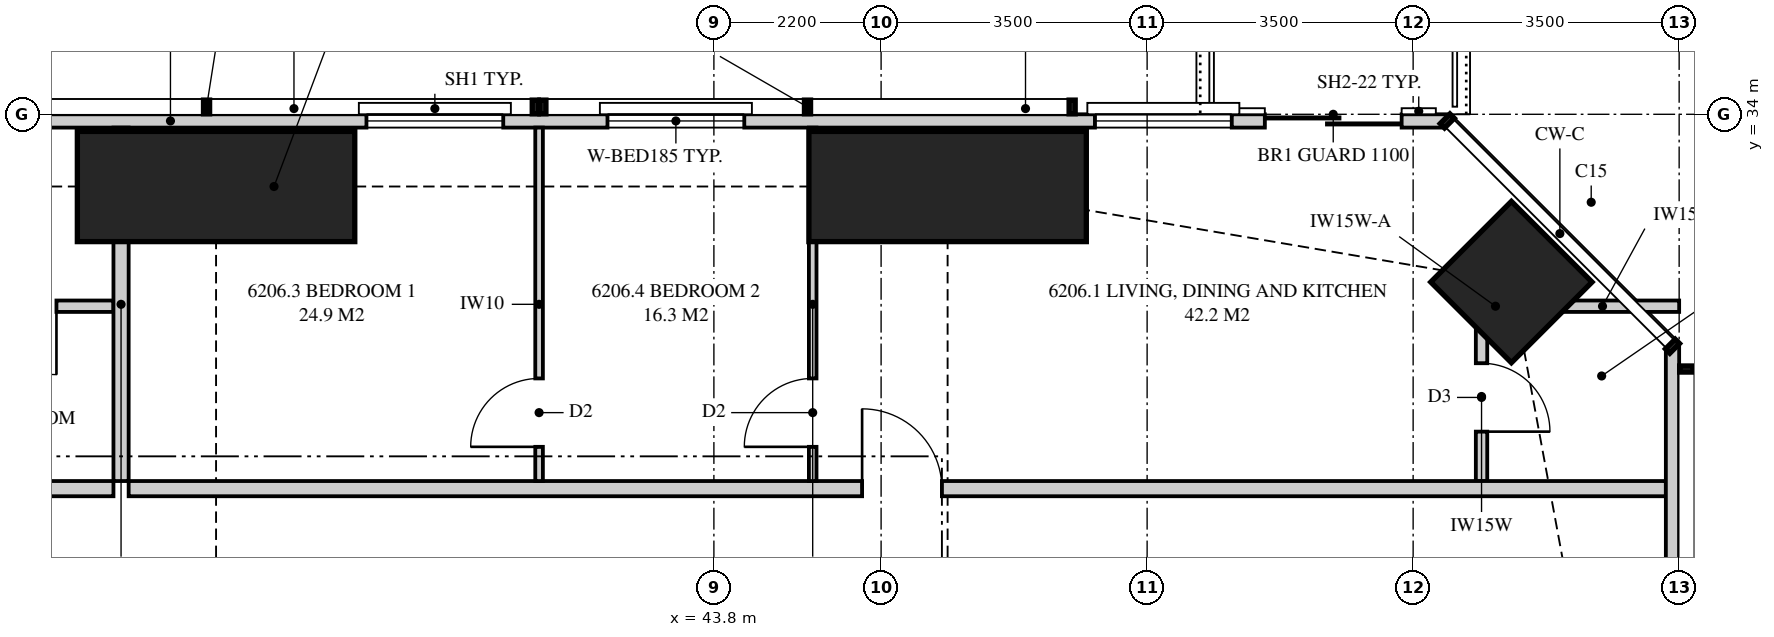
"""IFC4 building model, lengths in metres.
Left out: names, types, materials, properties, quantities, classifications, styles, units other than length and angle.
Written with IfcOpenShell. Run it as: python <this file> out.ifc"""

import sys

from ifc_helpers import new_model, si_unit, direction, frame, frame_2d, origin, origin_2d, place, context, subcontext, project, spatial, polyline, rectangle, outline, extrude, element, fill, save


model = new_model("IFC4")
c1 = context("Model", 3, precision=1e-05, world=origin(), true_north=direction((0.0, 1.0)))
c2 = subcontext(c1, "Body", "Model", "MODEL_VIEW")
j1 = project(units=[si_unit("LENGTHUNIT", "METRE"), si_unit("PLANEANGLEUNIT", "RADIAN")], contexts=[c1])
p1 = place(None, origin())
s1 = spatial("IfcSite", under=j1, at=p1, CompositionType="ELEMENT")
p2 = place(p1, origin())
s2 = spatial("IfcBuilding", under=s1, at=p2, CompositionType="ELEMENT")
p3 = place(p2, frame((0.0, 0.0, 228.45)))
s3 = spatial("IfcBuildingStorey", under=s2, at=p3, CompositionType="ELEMENT", Elevation=228.45)
p4 = place(p3, frame((54.293, 31.793, 0.0), z_axis=(0.0, 0.0, 1.0), x_axis=(0.707106781187, 0.707106781187, 0.0)))
e1 = element("IfcColumn", 1, at=p4, inside=s3, PredefinedType="COLUMN", context=c2, shape_type="SweptSolid", body=[
    extrude(rectangle(XDim=1.5, YDim=1.5, at=origin_2d()), origin(), (0.0, 0.0, 1.0), 3.5),
])
for number, where, z_axis, x_axis in (
    (2, (46.875, 33.05, 0.0), (0.0, 0.0, 1.0), (0.0, 1.0, 0.0)),
    (3, (37.25, 33.05, 0.0), (0.0, 0.0, 1.0), (0.0, 1.0, 0.0)),
):
    element("IfcColumn", number, at=place(p3, frame(where, z_axis=z_axis, x_axis=x_axis)), inside=s3, PredefinedType="COLUMN", context=c2, shape_type="SweptSolid", body=[
        extrude(rectangle(XDim=1.45, YDim=3.65, at=origin_2d()), origin(), (0.0, 0.0, 1.0), 3.5),
    ])
p5 = place(p3, frame((56.413, 3.051, 0.0), z_axis=(0.0, 0.0, 1.0), x_axis=(0.0, 1.0, 0.0)))
e4 = element("IfcWall", 4, at=p5, inside=s3, PredefinedType="SOLIDWALL", context=c2, shape_type="SweptSolid", body=[
    extrude(outline(polyline([(0.0, 0.0), (27.897, 0.0), (27.897, 3.26), (22.157, 3.26), (22.157, 2.3), (22.092, 2.3), (22.092, 3.26), (21.949, 3.26), (21.949, 2.3), (9.949, 2.3), (9.949, 3.26), (9.858, 3.26), (9.858, 2.3), (9.688, 2.3), (9.688, 3.26), (0.0, 3.26), (0.0, 0.0)])), frame((0.0, 0.087, 0.0), z_axis=(0.0, -1.0, 0.0), x_axis=(1.0, 0.0, 0.0)), (0.0, 0.0, 1.0), 0.175),
])
p6 = place(p5, frame((1.187, 0.0, 0.4)))
e5 = element("IfcOpeningElement", 5, at=p6, cuts=e4, PredefinedType="OPENING", context=c2, shape_type="SweptSolid", body=[
    extrude(rectangle(XDim=2.4, YDim=1.85, at=frame_2d((1.2, 0.925))), frame((0.0, 0.097, 0.0), z_axis=(0.0, -1.0, 0.0), x_axis=(1.0, 0.0, 0.0)), (0.0, 0.0, 1.0), 0.195),
])
p7 = place(p5, frame((11.897, 0.0, 0.4)))
e6 = element("IfcOpeningElement", 6, at=p7, cuts=e4, PredefinedType="OPENING", context=c2, shape_type="SweptSolid", body=[
    extrude(rectangle(XDim=1.8, YDim=1.85, at=frame_2d((0.9, 0.925))), frame((0.0, 0.097, 0.0), z_axis=(0.0, -1.0, 0.0), x_axis=(1.0, 0.0, 0.0)), (0.0, 0.0, 1.0), 0.195),
])
p8 = place(p5, frame((14.824, 0.0, 0.0)))
e7 = element("IfcOpeningElement", 7, at=p8, cuts=e4, PredefinedType="OPENING", context=c2, shape_type="SweptSolid", body=[
    extrude(rectangle(XDim=1.8, YDim=2.25, at=frame_2d((0.9, 1.125))), frame((0.0, 0.097, 0.0), z_axis=(0.0, -1.0, 0.0), x_axis=(1.0, 0.0, 0.0)), (0.0, 0.0, 1.0), 0.195),
])
p9 = place(p5, frame((18.224, 0.0, 0.4)))
e8 = element("IfcOpeningElement", 8, at=p9, cuts=e4, PredefinedType="OPENING", context=c2, shape_type="SweptSolid", body=[
    extrude(rectangle(XDim=1.8, YDim=1.85, at=frame_2d((0.9, 0.925))), frame((0.0, 0.097, 0.0), z_axis=(0.0, -1.0, 0.0), x_axis=(1.0, 0.0, 0.0)), (0.0, 0.0, 1.0), 0.195),
])
p10 = place(p3, frame((53.449, 33.913, 0.0), z_axis=(0.0, 0.0, 1.0), x_axis=(-1.0, 0.0, 0.0)))
e9 = element("IfcWall", 9, at=p10, inside=s3, PredefinedType="SOLIDWALL", context=c2, shape_type="SweptSolid", body=[
    extrude(outline(polyline([(0.0, 0.0), (33.597, 0.0), (33.597, 3.26), (26.039, 3.26), (26.039, 2.3), (25.955, 2.3), (25.955, 3.26), (25.824, 3.26), (25.824, 2.3), (6.574, 2.3), (6.574, 3.26), (6.442, 3.26), (6.442, 2.3), (6.359, 2.3), (6.359, 3.26), (0.0, 3.26), (0.0, 0.0)])), frame((0.0, 0.087, 0.0), z_axis=(0.0, -1.0, 0.0), x_axis=(1.0, 0.0, 0.0)), (0.0, 0.0, 1.0), 0.175),
])
p11 = place(p10, frame((0.6, 0.0, 0.0)))
e10 = element("IfcOpeningElement", 10, at=p11, cuts=e9, PredefinedType="OPENING", context=c2, shape_type="SweptSolid", body=[
    extrude(rectangle(XDim=1.8, YDim=2.25, at=frame_2d((0.9, 1.125))), frame((0.0, 0.097, 0.0), z_axis=(0.0, -1.0, 0.0), x_axis=(1.0, 0.0, 0.0)), (0.0, 0.0, 1.0), 0.195),
])
p12 = place(p10, frame((2.835, 0.0, 0.4)))
e11 = element("IfcOpeningElement", 11, at=p12, cuts=e9, PredefinedType="OPENING", context=c2, shape_type="SweptSolid", body=[
    extrude(rectangle(XDim=1.8, YDim=1.85, at=frame_2d((0.9, 0.925))), frame((0.0, 0.097, 0.0), z_axis=(0.0, -1.0, 0.0), x_axis=(1.0, 0.0, 0.0)), (0.0, 0.0, 1.0), 0.195),
])
p13 = place(p10, frame((9.249, 0.0, 0.4)))
e12 = element("IfcOpeningElement", 12, at=p13, cuts=e9, PredefinedType="OPENING", context=c2, shape_type="SweptSolid", body=[
    extrude(rectangle(XDim=1.8, YDim=1.85, at=frame_2d((0.9, 0.925))), frame((0.0, 0.097, 0.0), z_axis=(0.0, -1.0, 0.0), x_axis=(1.0, 0.0, 0.0)), (0.0, 0.0, 1.0), 0.195),
])
p14 = place(p10, frame((12.42, 0.0, 0.4)))
e13 = element("IfcOpeningElement", 13, at=p14, cuts=e9, PredefinedType="OPENING", context=c2, shape_type="SweptSolid", body=[
    extrude(rectangle(XDim=1.8, YDim=1.85, at=frame_2d((0.9, 0.925))), frame((0.0, 0.097, 0.0), z_axis=(0.0, -1.0, 0.0), x_axis=(1.0, 0.0, 0.0)), (0.0, 0.0, 1.0), 0.195),
])
p15 = place(p10, frame((20.949, 0.0, 0.4)))
e14 = element("IfcOpeningElement", 14, at=p15, cuts=e9, PredefinedType="OPENING", context=c2, shape_type="SweptSolid", body=[
    extrude(rectangle(XDim=2.4, YDim=1.85, at=frame_2d((1.2, 0.925))), frame((0.0, 0.097, 0.0), z_axis=(0.0, -1.0, 0.0), x_axis=(1.0, 0.0, 0.0)), (0.0, 0.0, 1.0), 0.195),
])
p16 = place(p10, frame((29.073, 0.0, 0.4)))
e15 = element("IfcOpeningElement", 15, at=p16, cuts=e9, PredefinedType="OPENING", context=c2, shape_type="SweptSolid", body=[
    extrude(rectangle(XDim=2.4, YDim=1.85, at=frame_2d((1.2, 0.925))), frame((0.0, 0.097, 0.0), z_axis=(0.0, -1.0, 0.0), x_axis=(1.0, 0.0, 0.0)), (0.0, 0.0, 1.0), 0.195),
])
p17 = place(p3, frame((36.0, 33.825, 0.0), z_axis=(0.0, 0.0, 1.0), x_axis=(0.0, -1.0, 0.0)))
e16 = element("IfcWall", 16, at=p17, inside=s3, PredefinedType="PARTITIONING", context=c2, shape_type="SweptSolid", body=[
    extrude(outline(polyline([(0.529, 2.3), (0.0, 2.3), (0.0, 0.0), (0.529, 0.0), (0.529, 0.281), (1.021, 0.281), (1.021, 0.0), (4.65, 0.0), (4.65, 2.66), (1.685, 2.66), (1.685, 2.3), (1.021, 2.3), (1.021, 2.019), (0.529, 2.019), (0.529, 2.3)])), frame((0.0, 0.1, 0.0), z_axis=(0.0, -1.0, 0.0), x_axis=(1.0, 0.0, 0.0)), (0.0, 0.0, 1.0), 0.2),
])
p18 = place(p3, frame((26.7, 29.075, 0.0), z_axis=(0.0, 0.0, 1.0), x_axis=(1.0, 0.0, 0.0)))
e17 = element("IfcWall", 17, at=p18, inside=s3, PredefinedType="PARTITIONING", context=c2, shape_type="SweptSolid", body=[
    extrude(outline(polyline([(0.0, 0.0), (9.2, 0.0), (9.2, 3.26), (2.235, 3.26), (2.235, 2.66), (0.0, 2.66), (0.0, 3.26), (0.0, 0.0)])), frame((0.0, 0.1, 0.0), z_axis=(0.0, -1.0, 0.0), x_axis=(1.0, 0.0, 0.0)), (0.0, 0.0, 1.0), 0.2),
])
p19 = place(p18, frame((4.1, 0.0, 0.0)))
e18 = element("IfcOpeningElement", 18, at=p19, cuts=e17, PredefinedType="OPENING", context=c2, shape_type="SweptSolid", body=[
    extrude(rectangle(XDim=1.05, YDim=2.2, at=frame_2d((0.525, 1.1))), frame((0.0, 0.11, 0.0), z_axis=(0.0, -1.0, 0.0), x_axis=(1.0, 0.0, 0.0)), (0.0, 0.0, 1.0), 0.22),
])
p20 = place(p3, frame((33.475, 31.475, 0.0), z_axis=(0.0, 0.0, 1.0), x_axis=(1.0, 0.0, 0.0)))
e19 = element("IfcWall", 19, at=p20, inside=s3, PredefinedType="PLUMBINGWALL", context=c2, shape_type="SweptSolid", body=[
    extrude(rectangle(XDim=2.425, YDim=0.15, at=frame_2d((1.212, 0.0))), origin(), (0.0, 0.0, 1.0), 3.26),
])
p21 = place(p20, frame((0.775, 0.0, 0.0)))
e20 = element("IfcOpeningElement", 20, at=p21, cuts=e19, PredefinedType="OPENING", context=c2, shape_type="SweptSolid", body=[
    extrude(rectangle(XDim=0.9, YDim=2.1, at=frame_2d((0.45, 1.05))), frame((0.0, 0.085, 0.0), z_axis=(0.0, -1.0, 0.0), x_axis=(1.0, 0.0, 0.0)), (0.0, 0.0, 1.0), 0.17),
])
p22 = place(p3, frame((36.1, 29.075, 0.0), z_axis=(0.0, 0.0, 1.0), x_axis=(1.0, 0.0, 0.0)))
e21 = element("IfcWall", 21, at=p22, inside=s3, PredefinedType="PARTITIONING", context=c2, shape_type="SweptSolid", body=[
    extrude(outline(polyline([(0.0, 0.0), (20.225, 0.0), (20.225, 3.26), (19.621, 3.26), (19.621, 2.3), (17.771, 2.3), (17.771, 3.26), (12.085, 3.26), (12.085, 2.66), (9.465, 2.66), (9.465, 3.26), (2.46, 3.26), (2.46, 2.66), (0.0, 2.66), (0.0, 3.26), (0.0, 0.0)])), frame((0.0, 0.1, 0.0), z_axis=(0.0, -1.0, 0.0), x_axis=(1.0, 0.0, 0.0)), (0.0, 0.0, 1.0), 0.2),
])
p23 = place(p22, frame((9.65, 0.0, 0.0)))
e22 = element("IfcOpeningElement", 22, at=p23, cuts=e21, PredefinedType="OPENING", context=c2, shape_type="SweptSolid", body=[
    extrude(rectangle(XDim=1.05, YDim=2.2, at=frame_2d((0.525, 1.1))), frame((0.0, 0.11, 0.0), z_axis=(0.0, -1.0, 0.0), x_axis=(1.0, 0.0, 0.0)), (0.0, 0.0, 1.0), 0.22),
])
p24 = place(p3, frame((53.975, 31.475, 0.0), z_axis=(0.0, 0.0, 1.0), x_axis=(1.0, 0.0, 0.0)))
e23 = element("IfcWall", 23, at=p24, inside=s3, PredefinedType="PLUMBINGWALL", context=c2, shape_type="SweptSolid", body=[
    extrude(rectangle(XDim=0.217, YDim=0.15, at=frame_2d((0.108, 0.0))), origin(), (0.0, 0.0, 1.0), 2.3),
])
p25 = place(p3, frame((54.483, 31.475, 0.0), z_axis=(0.0, 0.0, 1.0), x_axis=(1.0, 0.0, 0.0)))
e24 = element("IfcWall", 24, at=p25, inside=s3, PredefinedType="PLUMBINGWALL", context=c2, shape_type="SweptSolid", body=[
    extrude(outline(polyline([(0.768, 3.26), (0.768, 2.3), (0.407, 2.3), (0.396, 2.239), (0.0, 1.15), (0.396, 0.061), (0.407, 0.0), (2.017, 0.0), (2.017, 3.26), (0.768, 3.26)])), frame((0.0, 0.075, 0.0), z_axis=(0.0, -1.0, 0.0), x_axis=(1.0, 0.0, 0.0)), (0.0, 0.0, 1.0), 0.15),
])
p26 = place(p3, frame((53.9, 31.4, 0.0), z_axis=(0.0, 0.0, 1.0), x_axis=(0.0, -1.0, 0.0)))
e25 = element("IfcWall", 25, at=p26, inside=s3, PredefinedType="PLUMBINGWALL", context=c2, shape_type="SweptSolid", body=[
    extrude(outline(polyline([(0.0, 0.0), (2.225, 0.0), (2.225, 3.26), (2.225, 2.3), (0.438, 2.3), (0.0, 2.3), (0.0, 3.26), (0.0, 0.0)])), frame((0.0, 0.075, 0.0), z_axis=(0.0, -1.0, 0.0), x_axis=(1.0, 0.0, 0.0)), (0.0, 0.0, 1.0), 0.15),
])
p27 = place(p26, frame((0.675, 0.0, 0.0)))
e26 = element("IfcOpeningElement", 26, at=p27, cuts=e25, PredefinedType="OPENING", context=c2, shape_type="SweptSolid", body=[
    extrude(rectangle(XDim=0.9, YDim=2.1, at=frame_2d((0.45, 1.05))), frame((0.0, 0.085, 0.0), z_axis=(0.0, -1.0, 0.0), x_axis=(1.0, 0.0, 0.0)), (0.0, 0.0, 1.0), 0.17),
])
p28 = place(p3, frame((41.5, 33.825, 0.0), z_axis=(0.0, 0.0, 1.0), x_axis=(0.0, -1.0, 0.0)))
e27 = element("IfcWall", 27, at=p28, inside=s3, PredefinedType="PARTITIONING", context=c2, shape_type="SweptSolid", body=[
    extrude(outline(polyline([(0.0, 0.0), (4.65, 0.0), (4.65, 3.26), (1.635, 3.26), (1.635, 2.3), (0.0, 2.3), (0.0, 3.26), (0.0, 0.0)])), frame((0.0, 0.05, 0.0), z_axis=(0.0, -1.0, 0.0), x_axis=(1.0, 0.0, 0.0)), (0.0, 0.0, 1.0), 0.1),
])
p29 = place(p28, frame((3.3, 0.0, 0.0)))
e28 = element("IfcOpeningElement", 28, at=p29, cuts=e27, PredefinedType="OPENING", context=c2, shape_type="SweptSolid", body=[
    extrude(rectangle(XDim=0.9, YDim=2.1, at=frame_2d((0.45, 1.05))), frame((0.0, 0.06, 0.0), z_axis=(0.0, -1.0, 0.0), x_axis=(1.0, 0.0, 0.0)), (0.0, 0.0, 1.0), 0.12),
])
p30 = place(p3, frame((45.1, 33.825, 0.0), z_axis=(0.0, 0.0, 1.0), x_axis=(0.0, -1.0, 0.0)))
e29 = element("IfcWall", 29, at=p30, inside=s3, PredefinedType="PARTITIONING", context=c2, shape_type="SweptSolid", body=[
    extrude(outline(polyline([(0.0, 0.0), (4.65, 0.0), (4.65, 3.26), (1.635, 3.26), (1.635, 2.3), (0.0, 2.3), (0.0, 3.26), (0.0, 0.0)])), frame((0.0, 0.05, 0.0), z_axis=(0.0, -1.0, 0.0), x_axis=(1.0, 0.0, 0.0)), (0.0, 0.0, 1.0), 0.1),
])
p31 = place(p30, frame((3.3, 0.0, 0.0)))
e30 = element("IfcOpeningElement", 30, at=p31, cuts=e29, PredefinedType="OPENING", context=c2, shape_type="SweptSolid", body=[
    extrude(rectangle(XDim=0.9, YDim=2.1, at=frame_2d((0.45, 1.05))), frame((0.0, 0.06, 0.0), z_axis=(0.0, -1.0, 0.0), x_axis=(1.0, 0.0, 0.0)), (0.0, 0.0, 1.0), 0.12),
])
p32 = place(p11, origin())
e31 = element("IfcDoor", 31, at=p32, inside=s3, OperationType="SLIDING_TO_LEFT", PredefinedType="DOOR", context=c2, shape_type="SweptSolid", body=[
    extrude(rectangle(XDim=1.8, YDim=2.25, at=frame_2d((0.9, 1.125))), frame((0.0, 0.025, 0.0), z_axis=(0.0, -1.0, 0.0), x_axis=(1.0, 0.0, 0.0)), (0.0, 0.0, 1.0), 0.05),
])
fill(e10, e31)
p33 = place(p12, origin())
e32 = element("IfcWindow", 32, at=p33, inside=s3, PartitioningType="SINGLE_PANEL", PredefinedType="WINDOW", context=c2, shape_type="SweptSolid", body=[
    extrude(rectangle(XDim=1.8, YDim=1.85, at=frame_2d((0.9, 0.925))), frame((0.0, 0.03, 0.0), z_axis=(0.0, -1.0, 0.0), x_axis=(1.0, 0.0, 0.0)), (0.0, 0.0, 1.0), 0.06),
])
fill(e11, e32)
p34 = place(p13, origin())
e33 = element("IfcWindow", 33, at=p34, inside=s3, PartitioningType="SINGLE_PANEL", PredefinedType="WINDOW", context=c2, shape_type="SweptSolid", body=[
    extrude(rectangle(XDim=1.8, YDim=1.85, at=frame_2d((0.9, 0.925))), frame((0.0, 0.03, 0.0), z_axis=(0.0, -1.0, 0.0), x_axis=(1.0, 0.0, 0.0)), (0.0, 0.0, 1.0), 0.06),
])
fill(e12, e33)
p35 = place(p14, origin())
e34 = element("IfcWindow", 34, at=p35, inside=s3, PartitioningType="SINGLE_PANEL", PredefinedType="WINDOW", context=c2, shape_type="SweptSolid", body=[
    extrude(rectangle(XDim=1.8, YDim=1.85, at=frame_2d((0.9, 0.925))), frame((0.0, 0.03, 0.0), z_axis=(0.0, -1.0, 0.0), x_axis=(1.0, 0.0, 0.0)), (0.0, 0.0, 1.0), 0.06),
])
fill(e13, e34)
p36 = place(p21, frame((0.9, 0.0, 0.0), z_axis=(0.0, 0.0, 1.0), x_axis=(-1.0, 0.0, 0.0)))
e35 = element("IfcDoor", 35, at=p36, inside=s3, OperationType="SINGLE_SWING_LEFT", PredefinedType="DOOR", context=c2, shape_type="SweptSolid", body=[
    extrude(rectangle(XDim=0.9, YDim=2.1, at=frame_2d((0.45, 1.05))), frame((0.0, 0.025, 0.0), z_axis=(0.0, -1.0, 0.0), x_axis=(1.0, 0.0, 0.0)), (0.0, 0.0, 1.0), 0.05),
])
fill(e20, e35)
p37 = place(p23, origin())
e36 = element("IfcDoor", 36, at=p37, inside=s3, OperationType="SINGLE_SWING_LEFT", PredefinedType="DOOR", context=c2, shape_type="SweptSolid", body=[
    extrude(rectangle(XDim=1.05, YDim=2.2, at=frame_2d((0.525, 1.1))), frame((0.0, 0.025, 0.0), z_axis=(0.0, -1.0, 0.0), x_axis=(1.0, 0.0, 0.0)), (0.0, 0.0, 1.0), 0.05),
])
fill(e22, e36)
p38 = place(p27, origin())
e37 = element("IfcDoor", 37, at=p38, inside=s3, OperationType="SINGLE_SWING_RIGHT", PredefinedType="DOOR", context=c2, shape_type="SweptSolid", body=[
    extrude(rectangle(XDim=0.9, YDim=2.1, at=frame_2d((0.45, 1.05))), frame((0.0, 0.025, 0.0), z_axis=(0.0, -1.0, 0.0), x_axis=(1.0, 0.0, 0.0)), (0.0, 0.0, 1.0), 0.05),
])
fill(e26, e37)
p39 = place(p29, frame((0.9, 0.0, 0.0), z_axis=(0.0, 0.0, 1.0), x_axis=(-1.0, 0.0, 0.0)))
e38 = element("IfcDoor", 38, at=p39, inside=s3, OperationType="SINGLE_SWING_LEFT", PredefinedType="DOOR", context=c2, shape_type="SweptSolid", body=[
    extrude(rectangle(XDim=0.9, YDim=2.1, at=frame_2d((0.45, 1.05))), frame((0.0, 0.025, 0.0), z_axis=(0.0, -1.0, 0.0), x_axis=(1.0, 0.0, 0.0)), (0.0, 0.0, 1.0), 0.05),
])
fill(e28, e38)
p40 = place(p31, frame((0.9, 0.0, 0.0), z_axis=(0.0, 0.0, 1.0), x_axis=(-1.0, 0.0, 0.0)))
e39 = element("IfcDoor", 39, at=p40, inside=s3, OperationType="SINGLE_SWING_LEFT", PredefinedType="DOOR", context=c2, shape_type="SweptSolid", body=[
    extrude(rectangle(XDim=0.9, YDim=2.1, at=frame_2d((0.45, 1.05))), frame((0.0, 0.025, 0.0), z_axis=(0.0, -1.0, 0.0), x_axis=(1.0, 0.0, 0.0)), (0.0, 0.0, 1.0), 0.05),
])
fill(e30, e39)
save(model, sys.argv[1])
